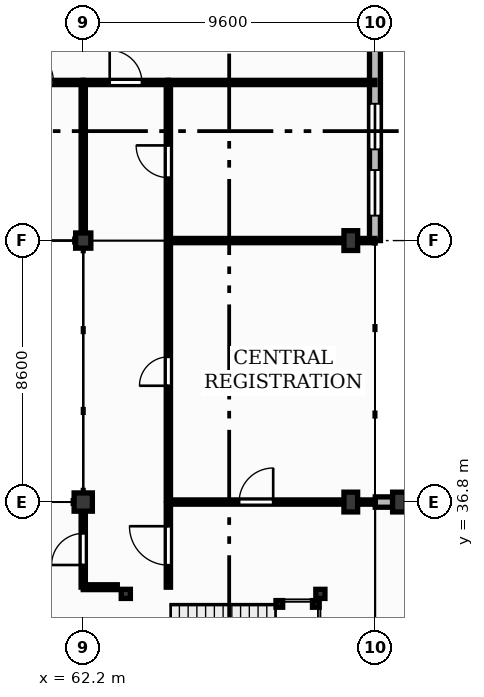
"""IFC4 building model, lengths in metres.
Left out: names, types, materials, properties, quantities, classifications, styles, units other than length and angle.
Written with IfcOpenShell. Run it as: python <this file> out.ifc"""

import sys

from ifc_helpers import new_model, si_unit, direction, frame, frame_2d, origin, origin_2d, place, context, subcontext, project, spatial, rectangle, hollow_circle, i_section, extrude, element, fill, save


model = new_model("IFC4")
c1 = context("Model", 3, precision=1e-05, world=origin(), true_north=direction((0.0, 1.0)))
c2 = subcontext(c1, "Body", "Model", "MODEL_VIEW")
j1 = project(units=[si_unit("LENGTHUNIT", "METRE"), si_unit("PLANEANGLEUNIT", "RADIAN")], contexts=[c1])
p1 = place(None, origin())
s1 = spatial("IfcSite", under=j1, at=p1, CompositionType="ELEMENT")
p2 = place(p1, origin())
s2 = spatial("IfcBuilding", under=s1, at=p2, CompositionType="ELEMENT")
p3 = place(p2, origin())
s3 = spatial("IfcBuildingStorey", under=s2, at=p3, CompositionType="ELEMENT", Elevation=0.0)
p4 = place(p3, frame((72.6, 36.8, 0.0), z_axis=(0.0, 0.0, 1.0), x_axis=(1.0, 0.0, 0.0)))
e1 = element("IfcColumn", 1, at=p4, inside=s3, PredefinedType="COLUMN", context=c2, shape_type="SweptSolid", body=[
    extrude(rectangle(XDim=0.45, YDim=0.65, at=origin_2d()), origin(), (0.0, 0.0, 1.0), 4.2),
])
p5 = place(p3, frame((62.2, 36.8, 0.0), z_axis=(0.0, 0.0, 1.0), x_axis=(1.0, 0.0, 0.0)))
e2 = element("IfcColumn", 2, at=p5, inside=s3, PredefinedType="COLUMN", context=c2, shape_type="SweptSolid", body=[
    extrude(rectangle(XDim=0.6, YDim=0.6, at=origin_2d()), origin(), (0.0, 0.0, 1.0), 4.2),
])
p6 = place(p3, frame((62.2, 45.4, 0.0), z_axis=(0.0, 0.0, 1.0), x_axis=(1.0, 0.0, 0.0)))
e3 = element("IfcColumn", 3, at=p6, inside=s3, PredefinedType="COLUMN", context=c2, shape_type="SweptSolid", body=[
    extrude(rectangle(XDim=0.5, YDim=0.5, at=origin_2d()), origin(), (0.0, 0.0, 1.0), 4.2),
])
for number, where, z_axis, x_axis in (
    (4, (71.0, 36.8, 0.0), (0.0, 0.0, 1.0), (1.0, 0.0, 0.0)),
    (5, (71.0, 45.4, 0.0), (0.0, 0.0, 1.0), (1.0, 0.0, 0.0)),
):
    element("IfcColumn", number, at=place(p3, frame(where, z_axis=z_axis, x_axis=x_axis)), inside=s3, PredefinedType="COLUMN", context=c2, shape_type="SweptSolid", body=[
        extrude(rectangle(XDim=0.45, YDim=0.65, at=origin_2d()), origin(), (0.0, 0.0, 1.0), 4.2),
    ])
p7 = place(p3, frame((71.795, 45.4, 0.0), z_axis=(0.0, 0.0, 1.0), x_axis=(0.0, 1.0, 0.0)))
e6 = element("IfcWall", 6, at=p7, inside=s3, PredefinedType="SOLIDWALL", context=c2, shape_type="SweptSolid", body=[
    extrude(rectangle(XDim=7.2, YDim=0.36, at=frame_2d((3.6, 0.0))), origin(), (0.0, 0.0, 1.0), 4.2),
])
p8 = place(p7, frame((0.82, 0.0, 1.5)))
e7 = element("IfcOpeningElement", 7, at=p8, cuts=e6, PredefinedType="OPENING", context=c2, shape_type="SweptSolid", body=[
    extrude(rectangle(XDim=1.5, YDim=1.25, at=frame_2d((0.75, 0.625))), frame((0.0, 0.19, 0.0), z_axis=(0.0, -1.0, 0.0), x_axis=(1.0, 0.0, 0.0)), (0.0, 0.0, 1.0), 0.38),
])
p9 = place(p7, frame((3.0, 0.0, 1.5)))
e8 = element("IfcOpeningElement", 8, at=p9, cuts=e6, PredefinedType="OPENING", context=c2, shape_type="SweptSolid", body=[
    extrude(rectangle(XDim=1.5, YDim=1.25, at=frame_2d((0.75, 0.625))), frame((0.0, 0.19, 0.0), z_axis=(0.0, -1.0, 0.0), x_axis=(1.0, 0.0, 0.0)), (0.0, 0.0, 1.0), 0.38),
])
p10 = place(p3, frame((71.805, 36.8, 0.0), z_axis=(0.0, 0.0, 1.0), x_axis=(1.0, 0.0, 0.0)))
e9 = element("IfcWall", 9, at=p10, inside=s3, PredefinedType="SOLIDWALL", context=c2, shape_type="SweptSolid", body=[
    extrude(rectangle(XDim=0.57, YDim=0.34, at=frame_2d((0.285, 0.0))), origin(), (0.0, 0.0, 1.0), 4.2),
])
for number, where, z_axis, x_axis in (
    (10, (70.0, 33.78, 0.0), (0.0, 0.0, 1.0), (1.0, 0.0, 0.0)),
    (11, (63.6, 33.78, 0.0), (0.0, 0.0, 1.0), (1.0, 0.0, 0.0)),
):
    element("IfcColumn", number, at=place(p3, frame(where, z_axis=z_axis, x_axis=x_axis)), inside=s3, PredefinedType="COLUMN", context=c2, shape_type="SweptSolid", body=[
        extrude(i_section(OverallWidth=0.3, OverallDepth=0.3, WebThickness=0.011, FlangeThickness=0.019, FilletRadius=0.027, at=origin_2d()), origin(), (0.0, 0.0, 1.0), 4.2),
    ])
for number, where, z_axis, x_axis in (
    (12, (69.85, 33.45, 0.0), (0.0, 0.0, 1.0), (1.0, 0.0, 0.0)),
    (13, (68.65, 33.45, 0.0), (0.0, 0.0, 1.0), (1.0, 0.0, 0.0)),
):
    element("IfcColumn", number, at=place(p3, frame(where, z_axis=z_axis, x_axis=x_axis)), inside=s3, PredefinedType="COLUMN", context=c2, shape_type="SweptSolid", body=[
        extrude(hollow_circle(Radius=0.11, WallThickness=0.01, at=origin_2d()), origin(), (0.0, 0.0, 1.0), 2.03),
    ])
p11 = place(p3, frame((59.025, 50.6, 0.0), z_axis=(0.0, 0.0, 1.0), x_axis=(1.0, 0.0, 0.0)))
e14 = element("IfcWall", 14, at=p11, inside=s3, PredefinedType="PARTITIONING", context=c2, shape_type="SweptSolid", body=[
    extrude(rectangle(XDim=3.175, YDim=0.14, at=frame_2d((1.587, 0.0))), origin(), (0.0, 0.0, 1.0), 4.18),
])
p12 = place(p11, frame((0.978, 0.0, 0.0)))
e15 = element("IfcOpeningElement", 15, at=p12, cuts=e14, PredefinedType="OPENING", context=c2, shape_type="SweptSolid", body=[
    extrude(rectangle(XDim=1.22, YDim=2.1, at=frame_2d((0.61, 1.05))), frame((0.0, 0.08, 0.0), z_axis=(0.0, -1.0, 0.0), x_axis=(1.0, 0.0, 0.0)), (0.0, 0.0, 1.0), 0.16),
])
p13 = place(p3, frame((62.2, 34.0, 0.0), z_axis=(0.0, 0.0, 1.0), x_axis=(0.0, 1.0, 0.0)))
e16 = element("IfcWall", 16, at=p13, inside=s3, PredefinedType="PARTITIONING", context=c2, shape_type="SweptSolid", body=[
    extrude(rectangle(XDim=2.5, YDim=0.14, at=frame_2d((1.25, 0.0))), origin(), (0.0, 0.0, 1.0), 3.4),
])
p14 = place(p13, frame((0.73, 0.0, 0.0)))
e17 = element("IfcOpeningElement", 17, at=p14, cuts=e16, PredefinedType="OPENING", context=c2, shape_type="SweptSolid", body=[
    extrude(rectangle(XDim=1.04, YDim=2.1, at=frame_2d((0.52, 1.05))), frame((0.0, 0.08, 0.0), z_axis=(0.0, -1.0, 0.0), x_axis=(1.0, 0.0, 0.0)), (0.0, 0.0, 1.0), 0.16),
])
p15 = place(p3, frame((62.2, 45.65, 0.0), z_axis=(0.0, 0.0, 1.0), x_axis=(0.0, 1.0, 0.0)))
e18 = element("IfcWall", 18, at=p15, inside=s3, PredefinedType="PARTITIONING", context=c2, shape_type="SweptSolid", body=[
    extrude(rectangle(XDim=4.88, YDim=0.14, at=frame_2d((2.44, 0.0))), origin(), (0.0, 0.0, 1.0), 3.5),
])
p16 = place(p3, frame((62.2, 50.6, 0.0), z_axis=(0.0, 0.0, 1.0), x_axis=(1.0, 0.0, 0.0)))
e19 = element("IfcWall", 19, at=p16, inside=s3, PredefinedType="PARTITIONING", context=c2, shape_type="SweptSolid", body=[
    extrude(rectangle(XDim=2.8, YDim=0.14, at=frame_2d((1.4, 0.0))), origin(), (0.0, 0.0, 1.0), 4.18),
])
p17 = place(p16, frame((0.87, 0.0, 0.0)))
e20 = element("IfcOpeningElement", 20, at=p17, cuts=e19, PredefinedType="OPENING", context=c2, shape_type="SweptSolid", body=[
    extrude(rectangle(XDim=1.06, YDim=2.15, at=frame_2d((0.53, 1.075))), frame((0.0, 0.08, 0.0), z_axis=(0.0, -1.0, 0.0), x_axis=(1.0, 0.0, 0.0)), (0.0, 0.0, 1.0), 0.16),
])
p18 = place(p3, frame((65.0, 34.0, 0.0), z_axis=(0.0, 0.0, 1.0), x_axis=(0.0, 1.0, 0.0)))
e21 = element("IfcWall", 21, at=p18, inside=s3, PredefinedType="PARTITIONING", context=c2, shape_type="SweptSolid", body=[
    extrude(rectangle(XDim=2.73, YDim=0.14, at=frame_2d((1.365, 0.0))), origin(), (0.0, 0.0, 1.0), 4.18),
])
p19 = place(p18, frame((0.725, 0.0, 0.0)))
e22 = element("IfcOpeningElement", 22, at=p19, cuts=e21, PredefinedType="OPENING", context=c2, shape_type="SweptSolid", body=[
    extrude(rectangle(XDim=1.28, YDim=2.2, at=frame_2d((0.64, 1.1))), frame((0.0, 0.08, 0.0), z_axis=(0.0, -1.0, 0.0), x_axis=(1.0, 0.0, 0.0)), (0.0, 0.0, 1.0), 0.16),
])
p20 = place(p3, frame((65.0, 36.87, 0.0), z_axis=(0.0, 0.0, 1.0), x_axis=(0.0, 1.0, 0.0)))
e23 = element("IfcWall", 23, at=p20, inside=s3, PredefinedType="PARTITIONING", context=c2, shape_type="SweptSolid", body=[
    extrude(rectangle(XDim=8.46, YDim=0.14, at=frame_2d((4.23, 0.0))), origin(), (0.0, 0.0, 1.0), 4.18),
])
p21 = place(p20, frame((3.755, 0.0, 0.0)))
e24 = element("IfcOpeningElement", 24, at=p21, cuts=e23, PredefinedType="OPENING", context=c2, shape_type="SweptSolid", body=[
    extrude(rectangle(XDim=0.95, YDim=2.1, at=frame_2d((0.475, 1.05))), frame((0.0, 0.08, 0.0), z_axis=(0.0, -1.0, 0.0), x_axis=(1.0, 0.0, 0.0)), (0.0, 0.0, 1.0), 0.16),
])
p22 = place(p3, frame((65.0, 36.8, 0.0), z_axis=(0.0, 0.0, 1.0), x_axis=(1.0, 0.0, 0.0)))
e25 = element("IfcWall", 25, at=p22, inside=s3, PredefinedType="PARTITIONING", context=c2, shape_type="SweptSolid", body=[
    extrude(rectangle(XDim=5.775, YDim=0.14, at=frame_2d((2.887, 0.0))), origin(), (0.0, 0.0, 1.0), 3.4),
])
p23 = place(p22, frame((2.327, 0.0, 0.0)))
e26 = element("IfcOpeningElement", 26, at=p23, cuts=e25, PredefinedType="OPENING", context=c2, shape_type="SweptSolid", body=[
    extrude(rectangle(XDim=1.12, YDim=2.15, at=frame_2d((0.56, 1.075))), frame((0.0, 0.08, 0.0), z_axis=(0.0, -1.0, 0.0), x_axis=(1.0, 0.0, 0.0)), (0.0, 0.0, 1.0), 0.16),
])
p24 = place(p3, frame((71.225, 36.8, 0.0), z_axis=(0.0, 0.0, 1.0), x_axis=(1.0, 0.0, 0.0)))
e27 = element("IfcWall", 27, at=p24, inside=s3, PredefinedType="PARTITIONING", context=c2, shape_type="SweptSolid", body=[
    extrude(rectangle(XDim=0.57, YDim=0.14, at=frame_2d((0.285, 0.0))), origin(), (0.0, 0.0, 1.0), 4.18),
])
p25 = place(p3, frame((65.0, 45.47, 0.0), z_axis=(0.0, 0.0, 1.0), x_axis=(0.0, 1.0, 0.0)))
e28 = element("IfcWall", 28, at=p25, inside=s3, PredefinedType="PARTITIONING", context=c2, shape_type="SweptSolid", body=[
    extrude(rectangle(XDim=5.06, YDim=0.14, at=frame_2d((2.53, 0.0))), origin(), (0.0, 0.0, 1.0), 4.18),
])
p26 = place(p25, frame((2.0, 0.0, 0.0)))
e29 = element("IfcOpeningElement", 29, at=p26, cuts=e28, PredefinedType="OPENING", context=c2, shape_type="SweptSolid", body=[
    extrude(rectangle(XDim=1.06, YDim=2.15, at=frame_2d((0.53, 1.075))), frame((0.0, 0.08, 0.0), z_axis=(0.0, -1.0, 0.0), x_axis=(1.0, 0.0, 0.0)), (0.0, 0.0, 1.0), 0.16),
])
p27 = place(p3, frame((65.0, 45.4, 0.0), z_axis=(0.0, 0.0, 1.0), x_axis=(1.0, 0.0, 0.0)))
e30 = element("IfcWall", 30, at=p27, inside=s3, PredefinedType="PARTITIONING", context=c2, shape_type="SweptSolid", body=[
    extrude(rectangle(XDim=5.775, YDim=0.14, at=frame_2d((2.887, 0.0))), origin(), (0.0, 0.0, 1.0), 3.05),
])
p28 = place(p3, frame((71.225, 45.4, 0.0), z_axis=(0.0, 0.0, 1.0), x_axis=(1.0, 0.0, 0.0)))
e31 = element("IfcWall", 31, at=p28, inside=s3, PredefinedType="PARTITIONING", context=c2, shape_type="SweptSolid", body=[
    extrude(rectangle(XDim=0.57, YDim=0.14, at=frame_2d((0.285, 0.0))), origin(), (0.0, 0.0, 1.0), 4.18),
])
p29 = place(p3, frame((65.0, 50.6, 0.0), z_axis=(0.0, 0.0, 1.0), x_axis=(1.0, 0.0, 0.0)))
e32 = element("IfcWall", 32, at=p29, inside=s3, PredefinedType="PARTITIONING", context=c2, shape_type="SweptSolid", body=[
    extrude(rectangle(XDim=6.795, YDim=0.14, at=frame_2d((3.397, 0.0))), origin(), (0.0, 0.0, 1.0), 4.18),
])
p30 = place(p3, frame((62.2, 34.0, 0.0), z_axis=(0.0, 0.0, 1.0), x_axis=(1.0, 0.0, 0.0)))
e33 = element("IfcWall", 33, at=p30, inside=s3, PredefinedType="PARTITIONING", context=c2, shape_type="SweptSolid", body=[
    extrude(rectangle(XDim=1.12, YDim=0.16, at=frame_2d((0.56, 0.0))), origin(), (0.0, 0.0, 1.0), 4.18),
])
p31 = place(p8, origin())
e34 = element("IfcWindow", 34, at=p31, inside=s3, PartitioningType="DOUBLE_PANEL_VERTICAL", PredefinedType="WINDOW", context=c2, shape_type="SweptSolid", body=[
    extrude(rectangle(XDim=1.5, YDim=1.25, at=frame_2d((0.75, 0.625))), frame((0.0, 0.03, 0.0), z_axis=(0.0, -1.0, 0.0), x_axis=(1.0, 0.0, 0.0)), (0.0, 0.0, 1.0), 0.06),
])
fill(e7, e34)
p32 = place(p9, origin())
e35 = element("IfcWindow", 35, at=p32, inside=s3, PartitioningType="DOUBLE_PANEL_VERTICAL", PredefinedType="WINDOW", context=c2, shape_type="SweptSolid", body=[
    extrude(rectangle(XDim=1.5, YDim=1.25, at=frame_2d((0.75, 0.625))), frame((0.0, 0.03, 0.0), z_axis=(0.0, -1.0, 0.0), x_axis=(1.0, 0.0, 0.0)), (0.0, 0.0, 1.0), 0.06),
])
fill(e8, e35)
p33 = place(p17, origin())
e36 = element("IfcDoor", 36, at=p33, inside=s3, OperationType="SINGLE_SWING_LEFT", PredefinedType="DOOR", context=c2, shape_type="SweptSolid", body=[
    extrude(rectangle(XDim=1.06, YDim=2.15, at=frame_2d((0.53, 1.075))), frame((0.0, 0.025, 0.0), z_axis=(0.0, -1.0, 0.0), x_axis=(1.0, 0.0, 0.0)), (0.0, 0.0, 1.0), 0.05),
])
fill(e20, e36)
p34 = place(p14, origin())
e37 = element("IfcDoor", 37, at=p34, inside=s3, OperationType="SINGLE_SWING_LEFT", PredefinedType="DOOR", context=c2, shape_type="SweptSolid", body=[
    extrude(rectangle(XDim=1.04, YDim=2.1, at=frame_2d((0.52, 1.05))), frame((0.0, 0.025, 0.0), z_axis=(0.0, -1.0, 0.0), x_axis=(1.0, 0.0, 0.0)), (0.0, 0.0, 1.0), 0.05),
])
fill(e17, e37)
p35 = place(p19, origin())
e38 = element("IfcDoor", 38, at=p35, inside=s3, OperationType="SINGLE_SWING_RIGHT", PredefinedType="DOOR", context=c2, shape_type="SweptSolid", body=[
    extrude(rectangle(XDim=1.28, YDim=2.2, at=frame_2d((0.64, 1.1))), frame((0.0, 0.025, 0.0), z_axis=(0.0, -1.0, 0.0), x_axis=(1.0, 0.0, 0.0)), (0.0, 0.0, 1.0), 0.05),
])
fill(e22, e38)
p36 = place(p21, origin())
e39 = element("IfcDoor", 39, at=p36, inside=s3, OperationType="SINGLE_SWING_LEFT", PredefinedType="DOOR", context=c2, shape_type="SweptSolid", body=[
    extrude(rectangle(XDim=0.95, YDim=2.1, at=frame_2d((0.475, 1.05))), frame((0.0, 0.025, 0.0), z_axis=(0.0, -1.0, 0.0), x_axis=(1.0, 0.0, 0.0)), (0.0, 0.0, 1.0), 0.05),
])
fill(e24, e39)
p37 = place(p23, origin())
e40 = element("IfcDoor", 40, at=p37, inside=s3, OperationType="SINGLE_SWING_RIGHT", PredefinedType="DOOR", context=c2, shape_type="SweptSolid", body=[
    extrude(rectangle(XDim=1.12, YDim=2.15, at=frame_2d((0.56, 1.075))), frame((0.0, 0.025, 0.0), z_axis=(0.0, -1.0, 0.0), x_axis=(1.0, 0.0, 0.0)), (0.0, 0.0, 1.0), 0.05),
])
fill(e26, e40)
p38 = place(p12, origin())
e41 = element("IfcDoor", 41, at=p38, inside=s3, OperationType="SINGLE_SWING_LEFT", PredefinedType="DOOR", context=c2, shape_type="SweptSolid", body=[
    extrude(rectangle(XDim=1.22, YDim=2.1, at=frame_2d((0.61, 1.05))), frame((0.0, 0.025, 0.0), z_axis=(0.0, -1.0, 0.0), x_axis=(1.0, 0.0, 0.0)), (0.0, 0.0, 1.0), 0.05),
])
fill(e15, e41)
p39 = place(p26, origin())
e42 = element("IfcDoor", 42, at=p39, inside=s3, OperationType="SINGLE_SWING_RIGHT", PredefinedType="DOOR", context=c2, shape_type="SweptSolid", body=[
    extrude(rectangle(XDim=1.06, YDim=2.15, at=frame_2d((0.53, 1.075))), frame((0.0, 0.025, 0.0), z_axis=(0.0, -1.0, 0.0), x_axis=(1.0, 0.0, 0.0)), (0.0, 0.0, 1.0), 0.05),
])
fill(e29, e42)
save(model, sys.argv[1])
